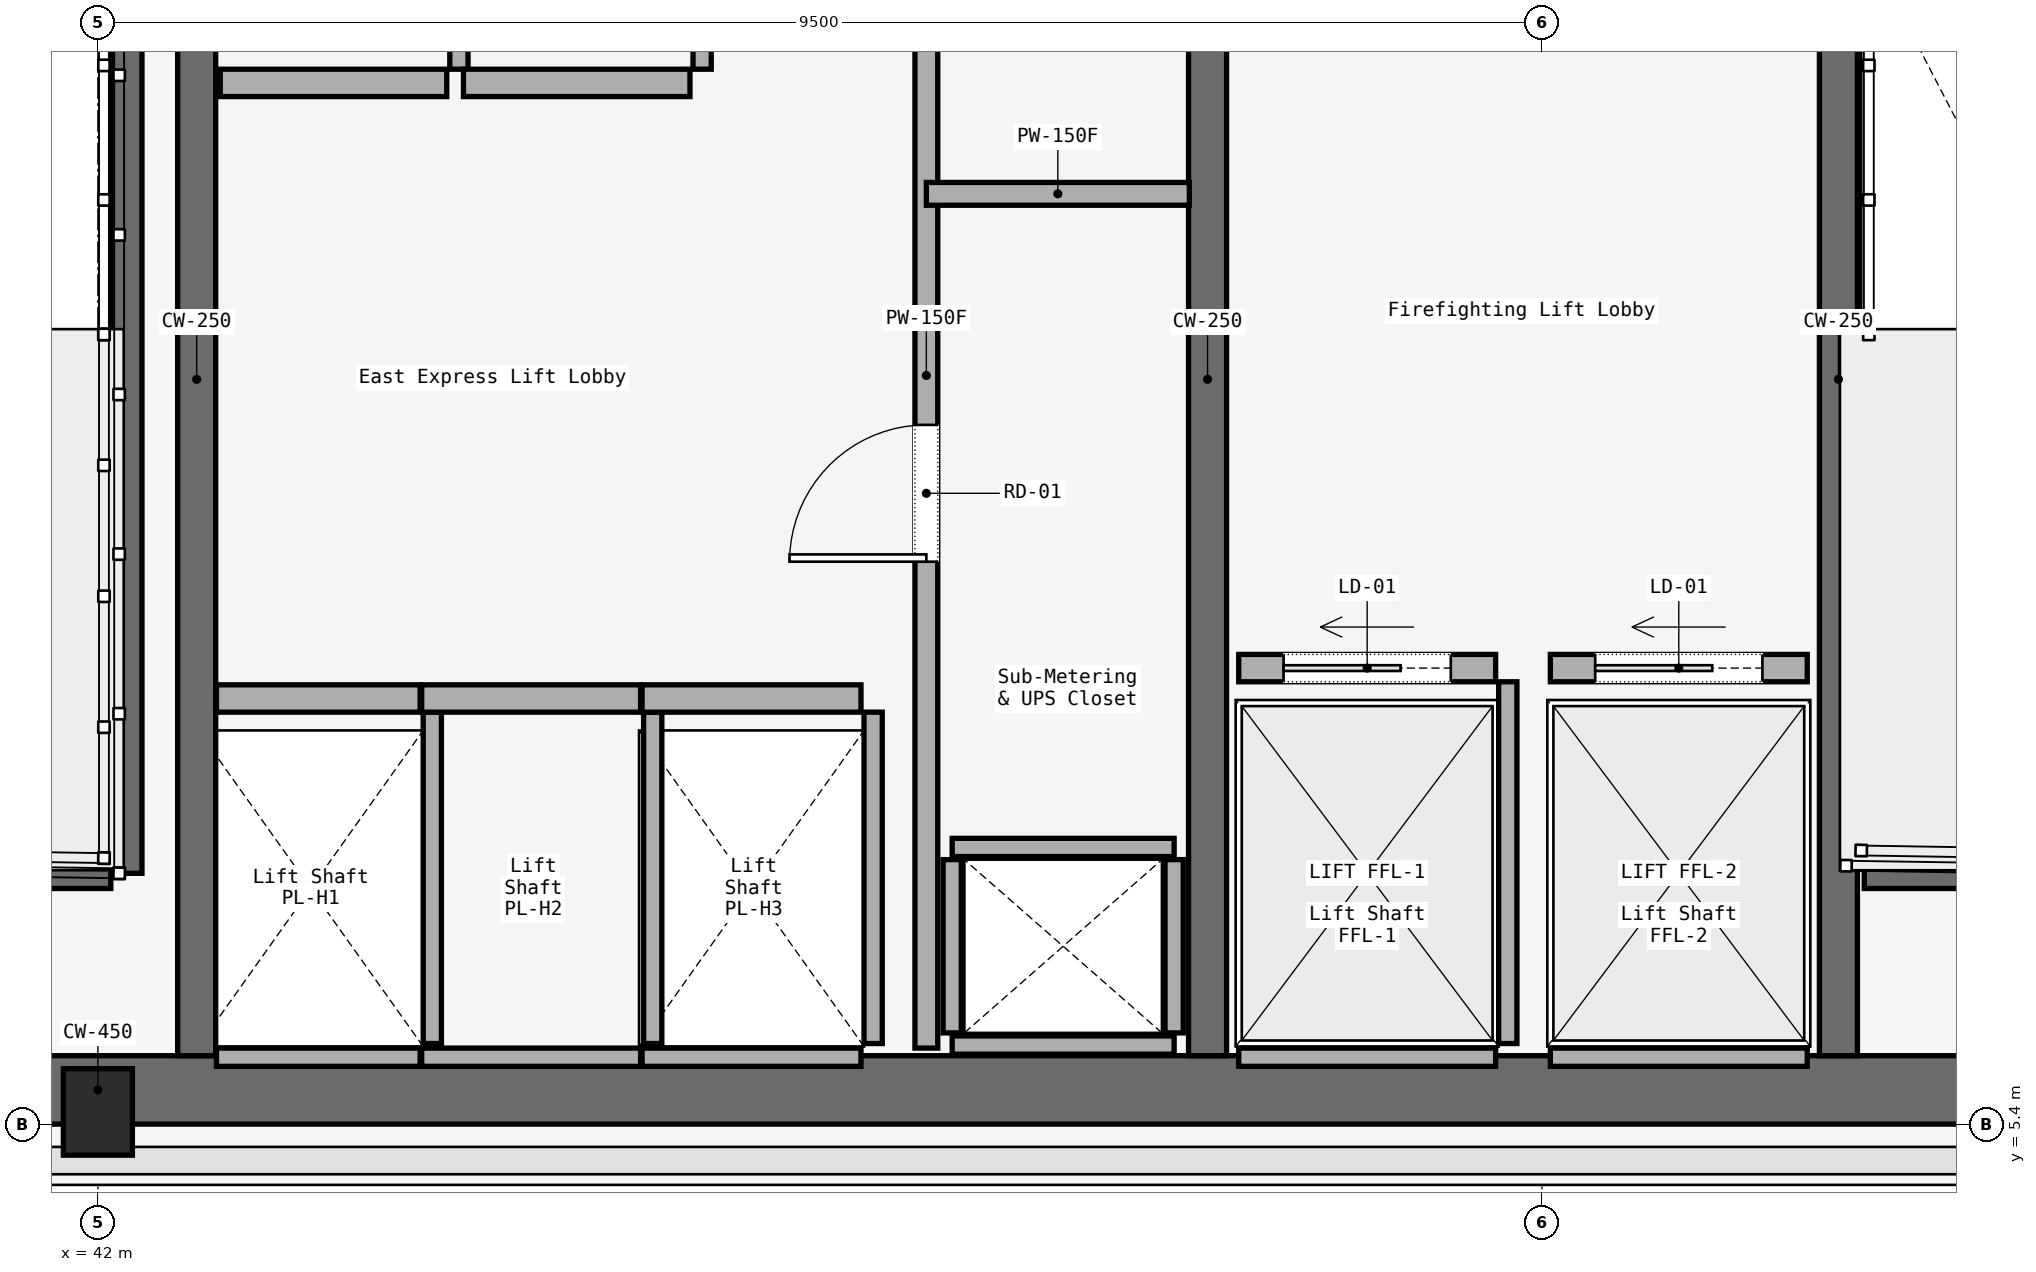
"""IFC4 building model, lengths in metres.
Left out: names, types, materials, properties, quantities, classifications, styles, units other than length and angle.
Written with IfcOpenShell. Run it as: python <this file> out.ifc"""

import sys

from ifc_helpers import new_model, si_unit, direction, frame, frame_2d, origin, origin_2d, place, context, subcontext, project, spatial, rectangle, i_section, extrude, element, fill, save


model = new_model("IFC4")
c1 = context("Model", 3, precision=1e-05, world=origin(), true_north=direction((0.0, 1.0)))
c2 = subcontext(c1, "Body", "Model", "MODEL_VIEW")
j1 = project(units=[si_unit("LENGTHUNIT", "METRE"), si_unit("PLANEANGLEUNIT", "RADIAN")], contexts=[c1])
p1 = place(None, origin())
s1 = spatial("IfcSite", under=j1, at=p1, CompositionType="ELEMENT")
p2 = place(p1, origin())
s2 = spatial("IfcBuilding", under=s1, at=p2, CompositionType="ELEMENT")
p3 = place(p2, frame((0.0, 0.0, 58.8)))
s3 = spatial("IfcBuildingStorey", under=s2, at=p3, CompositionType="ELEMENT", Elevation=58.8)
p4 = place(p3, frame((26.45, 5.625, 0.0), z_axis=(0.0, 0.0, 1.0), x_axis=(1.0, 0.0, 0.0)))
e1 = element("IfcWall", 1, at=p4, inside=s3, PredefinedType="SOLIDWALL", context=c2, shape_type="SweptSolid", body=[
    extrude(rectangle(XDim=31.1, YDim=0.45, at=frame_2d((15.55, 0.0))), origin(), (0.0, 0.0, 1.0), 3.58),
])
for number, where, z_axis, x_axis in (
    (2, (42.65, 5.85, 0.0), (0.0, 0.0, 1.0), (0.0, 1.0, 0.0)),
    (3, (49.3, 5.85, 0.0), (0.0, 0.0, 1.0), (0.0, 1.0, 0.0)),
):
    element("IfcWall", number, at=place(p3, frame(where, z_axis=z_axis, x_axis=x_axis)), inside=s3, PredefinedType="SOLIDWALL", context=c2, shape_type="SweptSolid", body=[
        extrude(rectangle(XDim=8.9, YDim=0.25, at=frame_2d((4.45, 0.0))), origin(), (0.0, 0.0, 1.0), 3.58),
    ])
p5 = place(p3, frame((53.45, 5.85, 0.0), z_axis=(0.0, 0.0, 1.0), x_axis=(0.0, 1.0, 0.0)))
e4 = element("IfcWall", 4, at=p5, inside=s3, PredefinedType="SOLIDWALL", context=c2, shape_type="SweptSolid", body=[
    extrude(rectangle(XDim=8.9, YDim=0.25, at=frame_2d((4.45, 0.0))), origin(), (0.0, 0.0, 1.0), 3.58),
])
p6 = place(p5, frame((7.45, 0.0, 0.0)))
e5 = element("IfcOpeningElement", 5, at=p6, cuts=e4, PredefinedType="OPENING", context=c2, shape_type="SweptSolid", body=[
    extrude(rectangle(XDim=1.1, YDim=2.2, at=frame_2d((0.55, 1.1))), frame((0.0, 0.125, 0.0), z_axis=(0.0, -1.0, 0.0), x_axis=(1.0, 0.0, 0.0)), (0.0, 0.0, 1.0), 0.25),
])
p7 = place(p3, frame((42.0, 5.48, 0.0), z_axis=(0.0, 0.0, 1.0), x_axis=(1.0, 0.0, 0.0)))
e6 = element("IfcColumn", 6, at=p7, inside=s3, PredefinedType="COLUMN", context=c2, shape_type="SweptSolid", body=[
    extrude(i_section(OverallWidth=0.454, OverallDepth=0.569, WebThickness=0.078, FlangeThickness=0.08, FilletRadius=0.015, at=origin_2d()), origin(), (0.0, 0.0, 1.0), 3.58),
])
p8 = place(p3, frame((42.19, 14.7, 0.0), z_axis=(0.0, 0.0, 1.0), x_axis=(0.0, -1.0, 0.0)))
e7 = element("IfcWall", 7, at=p8, inside=s3, PredefinedType="SOLIDWALL", context=c2, shape_type="SweptSolid", body=[
    extrude(rectangle(XDim=7.65, YDim=0.2, at=frame_2d((3.825, 0.0))), origin(), (0.0, 0.0, 1.0), 3.8),
])
for number, where, z_axis, x_axis in (
    (8, (38.97, 7.05, 0.0), (0.0, 0.0, 1.0), (1.0, 0.0, 0.0)),
    (9, (53.62, 7.05, 0.0), (0.0, 0.0, 1.0), (1.0, 0.0, 0.0)),
):
    element("IfcWall", number, at=place(p3, frame(where, z_axis=z_axis, x_axis=x_axis)), inside=s3, PredefinedType="SOLIDWALL", context=c2, shape_type="SweptSolid", body=[
        extrude(rectangle(XDim=3.115, YDim=0.2, at=frame_2d((1.558, 0.0))), origin(), (0.0, 0.0, 1.0), 3.8),
    ])
for number, where, z_axis, x_axis in (
    (10, (47.62, 5.92, 0.0), (0.0, 0.0, 1.0), (1.0, 0.0, 0.0)),
    (11, (47.62, 7.22, 0.0), (0.0, 0.0, 1.0), (1.0, 0.0, 0.0)),
):
    element("IfcWall", number, at=place(p3, frame(where, z_axis=z_axis, x_axis=x_axis)), inside=s3, PredefinedType="SOLIDWALL", context=c2, shape_type="SweptSolid", body=[
        extrude(rectangle(XDim=1.46, YDim=0.12, at=frame_2d((0.73, 0.0))), origin(), (0.0, 0.0, 1.0), 2.933),
    ])
for number, where, z_axis, x_axis in (
    (12, (47.62, 6.0, 0.0), (0.0, 0.0, 1.0), (0.0, 1.0, 0.0)),
    (13, (49.08, 6.0, 0.0), (0.0, 0.0, 1.0), (0.0, 1.0, 0.0)),
):
    element("IfcWall", number, at=place(p3, frame(where, z_axis=z_axis, x_axis=x_axis)), inside=s3, PredefinedType="SOLIDWALL", context=c2, shape_type="SweptSolid", body=[
        extrude(rectangle(XDim=1.14, YDim=0.12, at=frame_2d((0.57, 0.0))), origin(), (0.0, 0.0, 1.0), 2.933),
    ])
p9 = place(p3, frame((47.45, 5.9, 0.0), z_axis=(0.0, 0.0, 1.0), x_axis=(0.0, 1.0, 0.0)))
e14 = element("IfcWall", 14, at=p9, inside=s3, PredefinedType="PARTITIONING", context=c2, shape_type="SweptSolid", body=[
    extrude(rectangle(XDim=8.85, YDim=0.15, at=frame_2d((4.425, 0.0))), origin(), (0.0, 0.0, 1.0), 2.933),
])
p10 = place(p9, frame((3.2, 0.0, 0.0)))
e15 = element("IfcOpeningElement", 15, at=p10, cuts=e14, PredefinedType="OPENING", context=c2, shape_type="SweptSolid", body=[
    extrude(rectangle(XDim=0.9, YDim=2.1, at=frame_2d((0.45, 1.05))), frame((0.0, 0.075, 0.0), z_axis=(0.0, -1.0, 0.0), x_axis=(1.0, 0.0, 0.0)), (0.0, 0.0, 1.0), 0.15),
])
p11 = place(p3, frame((47.45, 11.52, 0.0), z_axis=(0.0, 0.0, 1.0), x_axis=(1.0, 0.0, 0.0)))
e16 = element("IfcWall", 16, at=p11, inside=s3, PredefinedType="PARTITIONING", context=c2, shape_type="SweptSolid", body=[
    extrude(rectangle(XDim=1.73, YDim=0.15, at=frame_2d((0.865, 0.0))), origin(), (0.0, 0.0, 1.0), 2.933),
])
p12 = place(p3, frame((42.78, 8.2, 0.0), z_axis=(0.0, 0.0, 1.0), x_axis=(1.0, 0.0, 0.0)))
e17 = element("IfcWall", 17, at=p12, inside=s3, PredefinedType="SOLIDWALL", context=c2, shape_type="SweptSolid", body=[
    extrude(rectangle(XDim=1.34, YDim=0.18, at=frame_2d((0.67, 0.0))), origin(), (0.0, 0.0, 1.0), 2.933),
])
p13 = place(p3, frame((42.78, 5.84, 0.0), z_axis=(0.0, 0.0, 1.0), x_axis=(1.0, 0.0, 0.0)))
e18 = element("IfcWall", 18, at=p13, inside=s3, PredefinedType="SOLIDWALL", context=c2, shape_type="SweptSolid", body=[
    extrude(rectangle(XDim=1.34, YDim=0.12, at=frame_2d((0.67, 0.0))), origin(), (0.0, 0.0, 1.0), 2.933),
])
p14 = place(p3, frame((44.2, 5.93, 0.0), z_axis=(0.0, 0.0, 1.0), x_axis=(0.0, 1.0, 0.0)))
e19 = element("IfcWall", 19, at=p14, inside=s3, PredefinedType="SOLIDWALL", context=c2, shape_type="SweptSolid", body=[
    extrude(rectangle(XDim=2.18, YDim=0.12, at=frame_2d((1.09, 0.0))), origin(), (0.0, 0.0, 1.0), 2.933),
])
p15 = place(p3, frame((44.13, 8.2, 0.0), z_axis=(0.0, 0.0, 1.0), x_axis=(1.0, 0.0, 0.0)))
e20 = element("IfcWall", 20, at=p15, inside=s3, PredefinedType="SOLIDWALL", context=c2, shape_type="SweptSolid", body=[
    extrude(rectangle(XDim=1.44, YDim=0.18, at=frame_2d((0.72, 0.0))), origin(), (0.0, 0.0, 1.0), 2.933),
])
p16 = place(p3, frame((44.13, 5.84, 0.0), z_axis=(0.0, 0.0, 1.0), x_axis=(1.0, 0.0, 0.0)))
e21 = element("IfcWall", 21, at=p16, inside=s3, PredefinedType="SOLIDWALL", context=c2, shape_type="SweptSolid", body=[
    extrude(rectangle(XDim=1.44, YDim=0.12, at=frame_2d((0.72, 0.0))), origin(), (0.0, 0.0, 1.0), 2.933),
])
p17 = place(p3, frame((45.65, 5.93, 0.0), z_axis=(0.0, 0.0, 1.0), x_axis=(0.0, 1.0, 0.0)))
e22 = element("IfcWall", 22, at=p17, inside=s3, PredefinedType="SOLIDWALL", context=c2, shape_type="SweptSolid", body=[
    extrude(rectangle(XDim=2.18, YDim=0.12, at=frame_2d((1.09, 0.0))), origin(), (0.0, 0.0, 1.0), 2.933),
])
p18 = place(p3, frame((45.58, 8.2, 0.0), z_axis=(0.0, 0.0, 1.0), x_axis=(1.0, 0.0, 0.0)))
e23 = element("IfcWall", 23, at=p18, inside=s3, PredefinedType="SOLIDWALL", context=c2, shape_type="SweptSolid", body=[
    extrude(rectangle(XDim=1.44, YDim=0.18, at=frame_2d((0.72, 0.0))), origin(), (0.0, 0.0, 1.0), 2.933),
])
p19 = place(p3, frame((45.58, 5.84, 0.0), z_axis=(0.0, 0.0, 1.0), x_axis=(1.0, 0.0, 0.0)))
e24 = element("IfcWall", 24, at=p19, inside=s3, PredefinedType="SOLIDWALL", context=c2, shape_type="SweptSolid", body=[
    extrude(rectangle(XDim=1.44, YDim=0.12, at=frame_2d((0.72, 0.0))), origin(), (0.0, 0.0, 1.0), 2.933),
])
p20 = place(p3, frame((47.1, 5.93, 0.0), z_axis=(0.0, 0.0, 1.0), x_axis=(0.0, 1.0, 0.0)))
e25 = element("IfcWall", 25, at=p20, inside=s3, PredefinedType="SOLIDWALL", context=c2, shape_type="SweptSolid", body=[
    extrude(rectangle(XDim=2.18, YDim=0.12, at=frame_2d((1.09, 0.0))), origin(), (0.0, 0.0, 1.0), 2.933),
])
p21 = place(p3, frame((42.805, 12.25, 0.0), z_axis=(0.0, 0.0, 1.0), x_axis=(1.0, 0.0, 0.0)))
e26 = element("IfcWall", 26, at=p21, inside=s3, PredefinedType="SOLIDWALL", context=c2, shape_type="SweptSolid", body=[
    extrude(rectangle(XDim=1.49, YDim=0.18, at=frame_2d((0.745, 0.0))), origin(), (0.0, 0.0, 1.0), 2.933),
])
p22 = place(p3, frame((44.375, 12.34, 0.0), z_axis=(0.0, 0.0, 1.0), x_axis=(0.0, 1.0, 0.0)))
e27 = element("IfcWall", 27, at=p22, inside=s3, PredefinedType="SOLIDWALL", context=c2, shape_type="SweptSolid", body=[
    extrude(rectangle(XDim=2.23, YDim=0.12, at=frame_2d((1.115, 0.0))), origin(), (0.0, 0.0, 1.0), 2.933),
])
p23 = place(p3, frame((44.405, 12.25, 0.0), z_axis=(0.0, 0.0, 1.0), x_axis=(1.0, 0.0, 0.0)))
e28 = element("IfcWall", 28, at=p23, inside=s3, PredefinedType="SOLIDWALL", context=c2, shape_type="SweptSolid", body=[
    extrude(rectangle(XDim=1.49, YDim=0.18, at=frame_2d((0.745, 0.0))), origin(), (0.0, 0.0, 1.0), 2.933),
])
p24 = place(p3, frame((45.975, 12.34, 0.0), z_axis=(0.0, 0.0, 1.0), x_axis=(0.0, 1.0, 0.0)))
e29 = element("IfcWall", 29, at=p24, inside=s3, PredefinedType="SOLIDWALL", context=c2, shape_type="SweptSolid", body=[
    extrude(rectangle(XDim=2.23, YDim=0.12, at=frame_2d((1.115, 0.0))), origin(), (0.0, 0.0, 1.0), 2.933),
])
p25 = place(p3, frame((49.505, 8.4, 0.0), z_axis=(0.0, 0.0, 1.0), x_axis=(1.0, 0.0, 0.0)))
e30 = element("IfcWall", 30, at=p25, inside=s3, PredefinedType="SOLIDWALL", context=c2, shape_type="SweptSolid", body=[
    extrude(rectangle(XDim=1.69, YDim=0.18, at=frame_2d((0.845, 0.0))), origin(), (0.0, 0.0, 1.0), 2.933),
])
p26 = place(p25, frame((0.295, 0.0, 0.0)))
e31 = element("IfcOpeningElement", 31, at=p26, cuts=e30, PredefinedType="OPENING", context=c2, shape_type="SweptSolid", body=[
    extrude(rectangle(XDim=1.1, YDim=2.2, at=frame_2d((0.55, 1.1))), frame((0.0, 0.09, 0.0), z_axis=(0.0, -1.0, 0.0), x_axis=(1.0, 0.0, 0.0)), (0.0, 0.0, 1.0), 0.18),
])
p27 = place(p3, frame((49.505, 5.84, 0.0), z_axis=(0.0, 0.0, 1.0), x_axis=(1.0, 0.0, 0.0)))
e32 = element("IfcWall", 32, at=p27, inside=s3, PredefinedType="SOLIDWALL", context=c2, shape_type="SweptSolid", body=[
    extrude(rectangle(XDim=1.69, YDim=0.12, at=frame_2d((0.845, 0.0))), origin(), (0.0, 0.0, 1.0), 2.933),
])
p28 = place(p3, frame((51.275, 5.93, 0.0), z_axis=(0.0, 0.0, 1.0), x_axis=(0.0, 1.0, 0.0)))
e33 = element("IfcWall", 33, at=p28, inside=s3, PredefinedType="SOLIDWALL", context=c2, shape_type="SweptSolid", body=[
    extrude(rectangle(XDim=2.38, YDim=0.12, at=frame_2d((1.19, 0.0))), origin(), (0.0, 0.0, 1.0), 2.933),
])
p29 = place(p3, frame((51.555, 8.4, 0.0), z_axis=(0.0, 0.0, 1.0), x_axis=(1.0, 0.0, 0.0)))
e34 = element("IfcWall", 34, at=p29, inside=s3, PredefinedType="SOLIDWALL", context=c2, shape_type="SweptSolid", body=[
    extrude(rectangle(XDim=1.69, YDim=0.18, at=frame_2d((0.845, 0.0))), origin(), (0.0, 0.0, 1.0), 2.933),
])
p30 = place(p29, frame((0.295, 0.0, 0.0)))
e35 = element("IfcOpeningElement", 35, at=p30, cuts=e34, PredefinedType="OPENING", context=c2, shape_type="SweptSolid", body=[
    extrude(rectangle(XDim=1.1, YDim=2.2, at=frame_2d((0.55, 1.1))), frame((0.0, 0.09, 0.0), z_axis=(0.0, -1.0, 0.0), x_axis=(1.0, 0.0, 0.0)), (0.0, 0.0, 1.0), 0.18),
])
p31 = place(p3, frame((51.555, 5.84, 0.0), z_axis=(0.0, 0.0, 1.0), x_axis=(1.0, 0.0, 0.0)))
e36 = element("IfcWall", 36, at=p31, inside=s3, PredefinedType="SOLIDWALL", context=c2, shape_type="SweptSolid", body=[
    extrude(rectangle(XDim=1.69, YDim=0.12, at=frame_2d((0.845, 0.0))), origin(), (0.0, 0.0, 1.0), 2.933),
])
p32 = place(p10, origin())
e37 = element("IfcDoor", 37, at=p32, inside=s3, OperationType="SINGLE_SWING_LEFT", PredefinedType="DOOR", context=c2, shape_type="SweptSolid", body=[
    extrude(rectangle(XDim=0.9, YDim=2.1, at=frame_2d((0.45, 1.05))), frame((0.0, 0.025, 0.0), z_axis=(0.0, -1.0, 0.0), x_axis=(1.0, 0.0, 0.0)), (0.0, 0.0, 1.0), 0.05),
])
fill(e15, e37)
p33 = place(p26, origin())
e38 = element("IfcDoor", 38, at=p33, inside=s3, OperationType="SLIDING_TO_LEFT", PredefinedType="DOOR", context=c2, shape_type="SweptSolid", body=[
    extrude(rectangle(XDim=1.1, YDim=2.2, at=frame_2d((0.55, 1.1))), frame((0.0, 0.025, 0.0), z_axis=(0.0, -1.0, 0.0), x_axis=(1.0, 0.0, 0.0)), (0.0, 0.0, 1.0), 0.05),
])
fill(e31, e38)
p34 = place(p30, origin())
e39 = element("IfcDoor", 39, at=p34, inside=s3, OperationType="SLIDING_TO_LEFT", PredefinedType="DOOR", context=c2, shape_type="SweptSolid", body=[
    extrude(rectangle(XDim=1.1, YDim=2.2, at=frame_2d((0.55, 1.1))), frame((0.0, 0.025, 0.0), z_axis=(0.0, -1.0, 0.0), x_axis=(1.0, 0.0, 0.0)), (0.0, 0.0, 1.0), 0.05),
])
fill(e35, e39)
save(model, sys.argv[1])
